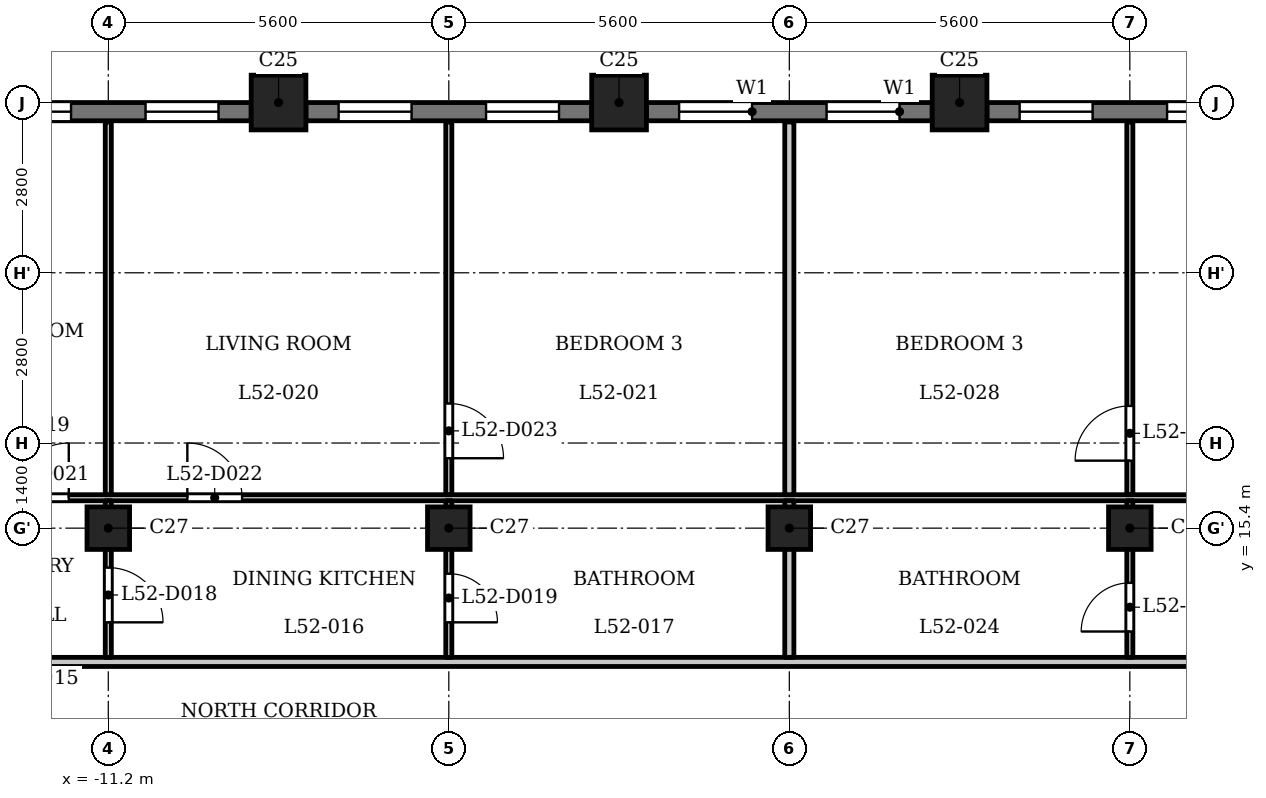
"""IFC4 building model, lengths in metres.
Left out: names, types, materials, properties, quantities, classifications, styles, units other than length and angle.
Written with IfcOpenShell. Run it as: python <this file> out.ifc"""

import sys

from ifc_helpers import new_model, si_unit, direction, frame, frame_2d, origin, origin_2d, place, context, subcontext, project, spatial, rectangle, extrude, element, fill, save


model = new_model("IFC4")
c1 = context("Model", 3, precision=1e-05, world=origin(), true_north=direction((0.0, 1.0)))
c2 = subcontext(c1, "Body", "Model", "MODEL_VIEW")
j1 = project(units=[si_unit("LENGTHUNIT", "METRE"), si_unit("PLANEANGLEUNIT", "RADIAN")], contexts=[c1])
p1 = place(None, origin())
s1 = spatial("IfcSite", under=j1, at=p1, CompositionType="ELEMENT")
p2 = place(p1, origin())
s2 = spatial("IfcBuilding", under=s1, at=p2, CompositionType="ELEMENT")
p3 = place(p2, frame((0.0, 0.0, 202.9)))
s3 = spatial("IfcBuildingStorey", under=s2, at=p3, CompositionType="ELEMENT", Elevation=202.9)
for number, where, z_axis, x_axis in (
    (1, (2.8, 22.4, 0.0), (0.0, 0.0, 1.0), (1.0, 0.0, 0.0)),
    (2, (-2.8, 22.4, 0.0), (0.0, 0.0, 1.0), (1.0, 0.0, 0.0)),
    (3, (-8.4, 22.4, 0.0), (0.0, 0.0, 1.0), (1.0, 0.0, 0.0)),
):
    element("IfcColumn", number, at=place(p3, frame(where, z_axis=z_axis, x_axis=x_axis)), inside=s3, PredefinedType="COLUMN", context=c2, shape_type="SweptSolid", body=[
        extrude(rectangle(XDim=0.9, YDim=0.9, at=origin_2d()), origin(), (0.0, 0.0, 1.0), 3.5),
    ])
for number, where, z_axis, x_axis in (
    (4, (-11.2, 15.4, 0.0), (0.0, 0.0, 1.0), (1.0, 0.0, 0.0)),
    (5, (-5.6, 15.4, 0.0), (0.0, 0.0, 1.0), (1.0, 0.0, 0.0)),
    (6, (0.0, 15.4, 0.0), (0.0, 0.0, 1.0), (1.0, 0.0, 0.0)),
    (7, (5.6, 15.4, 0.0), (0.0, 0.0, 1.0), (1.0, 0.0, 0.0)),
):
    element("IfcColumn", number, at=place(p3, frame(where, z_axis=z_axis, x_axis=x_axis)), inside=s3, PredefinedType="COLUMN", context=c2, shape_type="SweptSolid", body=[
        extrude(rectangle(XDim=0.7, YDim=0.7, at=origin_2d()), origin(), (0.0, 0.0, 1.0), 3.5),
    ])
p4 = place(p3, frame((7.95, 22.25, 0.0), z_axis=(0.0, 0.0, 1.0), x_axis=(-1.0, 0.0, 0.0)))
e8 = element("IfcWall", 8, at=p4, inside=s3, PredefinedType="SOLIDWALL", context=c2, shape_type="SweptSolid", body=[
    extrude(rectangle(XDim=4.7, YDim=0.3, at=frame_2d((2.35, 0.0))), origin(), (0.0, 0.0, 1.0), 2.5),
])
p5 = place(p4, frame((0.538, 0.0, 0.6)))
e9 = element("IfcOpeningElement", 9, at=p5, cuts=e8, PredefinedType="OPENING", context=c2, shape_type="SweptSolid", body=[
    extrude(rectangle(XDim=1.2, YDim=1.55, at=frame_2d((0.6, 0.775))), frame((0.0, 0.16, 0.0), z_axis=(0.0, -1.0, 0.0), x_axis=(1.0, 0.0, 0.0)), (0.0, 0.0, 1.0), 0.32),
])
p6 = place(p4, frame((2.962, 0.0, 0.6)))
e10 = element("IfcOpeningElement", 10, at=p6, cuts=e8, PredefinedType="OPENING", context=c2, shape_type="SweptSolid", body=[
    extrude(rectangle(XDim=1.2, YDim=1.55, at=frame_2d((0.6, 0.775))), frame((0.0, 0.16, 0.0), z_axis=(0.0, -1.0, 0.0), x_axis=(1.0, 0.0, 0.0)), (0.0, 0.0, 1.0), 0.32),
])
p7 = place(p3, frame((2.35, 22.25, 0.0), z_axis=(0.0, 0.0, 1.0), x_axis=(-1.0, 0.0, 0.0)))
e11 = element("IfcWall", 11, at=p7, inside=s3, PredefinedType="SOLIDWALL", context=c2, shape_type="SweptSolid", body=[
    extrude(rectangle(XDim=4.7, YDim=0.3, at=frame_2d((2.35, 0.0))), origin(), (0.0, 0.0, 1.0), 2.5),
])
p8 = place(p7, frame((0.538, 0.0, 0.6)))
e12 = element("IfcOpeningElement", 12, at=p8, cuts=e11, PredefinedType="OPENING", context=c2, shape_type="SweptSolid", body=[
    extrude(rectangle(XDim=1.2, YDim=1.55, at=frame_2d((0.6, 0.775))), frame((0.0, 0.16, 0.0), z_axis=(0.0, -1.0, 0.0), x_axis=(1.0, 0.0, 0.0)), (0.0, 0.0, 1.0), 0.32),
])
p9 = place(p7, frame((2.962, 0.0, 0.6)))
e13 = element("IfcOpeningElement", 13, at=p9, cuts=e11, PredefinedType="OPENING", context=c2, shape_type="SweptSolid", body=[
    extrude(rectangle(XDim=1.2, YDim=1.55, at=frame_2d((0.6, 0.775))), frame((0.0, 0.16, 0.0), z_axis=(0.0, -1.0, 0.0), x_axis=(1.0, 0.0, 0.0)), (0.0, 0.0, 1.0), 0.32),
])
p10 = place(p3, frame((-3.25, 22.25, 0.0), z_axis=(0.0, 0.0, 1.0), x_axis=(-1.0, 0.0, 0.0)))
e14 = element("IfcWall", 14, at=p10, inside=s3, PredefinedType="SOLIDWALL", context=c2, shape_type="SweptSolid", body=[
    extrude(rectangle(XDim=4.7, YDim=0.3, at=frame_2d((2.35, 0.0))), origin(), (0.0, 0.0, 1.0), 2.5),
])
p11 = place(p10, frame((0.538, 0.0, 0.6)))
e15 = element("IfcOpeningElement", 15, at=p11, cuts=e14, PredefinedType="OPENING", context=c2, shape_type="SweptSolid", body=[
    extrude(rectangle(XDim=1.2, YDim=1.55, at=frame_2d((0.6, 0.775))), frame((0.0, 0.16, 0.0), z_axis=(0.0, -1.0, 0.0), x_axis=(1.0, 0.0, 0.0)), (0.0, 0.0, 1.0), 0.32),
])
p12 = place(p10, frame((2.962, 0.0, 0.6)))
e16 = element("IfcOpeningElement", 16, at=p12, cuts=e14, PredefinedType="OPENING", context=c2, shape_type="SweptSolid", body=[
    extrude(rectangle(XDim=1.2, YDim=1.55, at=frame_2d((0.6, 0.775))), frame((0.0, 0.16, 0.0), z_axis=(0.0, -1.0, 0.0), x_axis=(1.0, 0.0, 0.0)), (0.0, 0.0, 1.0), 0.32),
])
p13 = place(p3, frame((-8.85, 22.25, 0.0), z_axis=(0.0, 0.0, 1.0), x_axis=(-1.0, 0.0, 0.0)))
e17 = element("IfcWall", 17, at=p13, inside=s3, PredefinedType="SOLIDWALL", context=c2, shape_type="SweptSolid", body=[
    extrude(rectangle(XDim=4.7, YDim=0.3, at=frame_2d((2.35, 0.0))), origin(), (0.0, 0.0, 1.0), 2.5),
])
p14 = place(p13, frame((0.538, 0.0, 0.6)))
e18 = element("IfcOpeningElement", 18, at=p14, cuts=e17, PredefinedType="OPENING", context=c2, shape_type="SweptSolid", body=[
    extrude(rectangle(XDim=1.2, YDim=1.55, at=frame_2d((0.6, 0.775))), frame((0.0, 0.16, 0.0), z_axis=(0.0, -1.0, 0.0), x_axis=(1.0, 0.0, 0.0)), (0.0, 0.0, 1.0), 0.32),
])
p15 = place(p13, frame((2.962, 0.0, 0.6)))
e19 = element("IfcOpeningElement", 19, at=p15, cuts=e17, PredefinedType="OPENING", context=c2, shape_type="SweptSolid", body=[
    extrude(rectangle(XDim=1.2, YDim=1.55, at=frame_2d((0.6, 0.775))), frame((0.0, 0.16, 0.0), z_axis=(0.0, -1.0, 0.0), x_axis=(1.0, 0.0, 0.0)), (0.0, 0.0, 1.0), 0.32),
])
p16 = place(p3, frame((-17.4, 13.2, 0.0), z_axis=(0.0, 0.0, 1.0), x_axis=(1.0, 0.0, 0.0)))
e20 = element("IfcWall", 20, at=p16, inside=s3, PredefinedType="PARTITIONING", context=c2, shape_type="SweptSolid", body=[
    extrude(rectangle(XDim=34.8, YDim=0.15, at=frame_2d((17.4, 0.0))), origin(), (0.0, 0.0, 1.0), 3.2),
])
p17 = place(p16, frame((0.25, 0.0, 0.0)))
e21 = element("IfcOpeningElement", 21, at=p17, cuts=e20, PredefinedType="OPENING", context=c2, shape_type="SweptSolid", body=[
    extrude(rectangle(XDim=1.0, YDim=2.1, at=frame_2d((0.5, 1.05))), frame((0.0, 0.085, 0.0), z_axis=(0.0, -1.0, 0.0), x_axis=(1.0, 0.0, 0.0)), (0.0, 0.0, 1.0), 0.17),
])
p18 = place(p16, frame((33.65, 0.0, 0.0)))
e22 = element("IfcOpeningElement", 22, at=p18, cuts=e20, PredefinedType="OPENING", context=c2, shape_type="SweptSolid", body=[
    extrude(rectangle(XDim=1.0, YDim=2.1, at=frame_2d((0.5, 1.05))), frame((0.0, 0.085, 0.0), z_axis=(0.0, -1.0, 0.0), x_axis=(1.0, 0.0, 0.0)), (0.0, 0.0, 1.0), 0.17),
])
p19 = place(p3, frame((-16.725, 15.9, 0.0), z_axis=(0.0, 0.0, 1.0), x_axis=(1.0, 0.0, 0.0)))
e23 = element("IfcWall", 23, at=p19, inside=s3, PredefinedType="PARTITIONING", context=c2, shape_type="SweptSolid", body=[
    extrude(rectangle(XDim=33.45, YDim=0.1, at=frame_2d((16.725, 0.0))), origin(), (0.0, 0.0, 1.0), 3.2),
])
p20 = place(p19, frame((1.875, 0.0, 0.0)))
e24 = element("IfcOpeningElement", 24, at=p20, cuts=e23, PredefinedType="OPENING", context=c2, shape_type="SweptSolid", body=[
    extrude(rectangle(XDim=0.9, YDim=2.1, at=frame_2d((0.45, 1.05))), frame((0.0, 0.06, 0.0), z_axis=(0.0, -1.0, 0.0), x_axis=(1.0, 0.0, 0.0)), (0.0, 0.0, 1.0), 0.12),
])
p21 = place(p19, frame((3.975, 0.0, 0.0)))
e25 = element("IfcOpeningElement", 25, at=p21, cuts=e23, PredefinedType="OPENING", context=c2, shape_type="SweptSolid", body=[
    extrude(rectangle(XDim=0.9, YDim=2.1, at=frame_2d((0.45, 1.05))), frame((0.0, 0.06, 0.0), z_axis=(0.0, -1.0, 0.0), x_axis=(1.0, 0.0, 0.0)), (0.0, 0.0, 1.0), 0.12),
])
p22 = place(p19, frame((6.825, 0.0, 0.0)))
e26 = element("IfcOpeningElement", 26, at=p22, cuts=e23, PredefinedType="OPENING", context=c2, shape_type="SweptSolid", body=[
    extrude(rectangle(XDim=0.9, YDim=2.1, at=frame_2d((0.45, 1.05))), frame((0.0, 0.06, 0.0), z_axis=(0.0, -1.0, 0.0), x_axis=(1.0, 0.0, 0.0)), (0.0, 0.0, 1.0), 0.12),
])
p23 = place(p19, frame((28.975, 0.0, 0.0)))
e27 = element("IfcOpeningElement", 27, at=p23, cuts=e23, PredefinedType="OPENING", context=c2, shape_type="SweptSolid", body=[
    extrude(rectangle(XDim=0.9, YDim=2.1, at=frame_2d((0.45, 1.05))), frame((0.0, 0.06, 0.0), z_axis=(0.0, -1.0, 0.0), x_axis=(1.0, 0.0, 0.0)), (0.0, 0.0, 1.0), 0.12),
])
p24 = place(p19, frame((30.725, 0.0, 0.0)))
e28 = element("IfcOpeningElement", 28, at=p24, cuts=e23, PredefinedType="OPENING", context=c2, shape_type="SweptSolid", body=[
    extrude(rectangle(XDim=0.9, YDim=2.1, at=frame_2d((0.45, 1.05))), frame((0.0, 0.06, 0.0), z_axis=(0.0, -1.0, 0.0), x_axis=(1.0, 0.0, 0.0)), (0.0, 0.0, 1.0), 0.12),
])
p25 = place(p19, frame((25.625, 0.0, 0.0)))
e29 = element("IfcOpeningElement", 29, at=p25, cuts=e23, PredefinedType="OPENING", context=c2, shape_type="SweptSolid", body=[
    extrude(rectangle(XDim=0.9, YDim=2.1, at=frame_2d((0.45, 1.05))), frame((0.0, 0.06, 0.0), z_axis=(0.0, -1.0, 0.0), x_axis=(1.0, 0.0, 0.0)), (0.0, 0.0, 1.0), 0.12),
])
p26 = place(p3, frame((-11.2, 13.275, 0.0), z_axis=(0.0, 0.0, 1.0), x_axis=(0.0, 1.0, 0.0)))
e30 = element("IfcWall", 30, at=p26, inside=s3, PredefinedType="PARTITIONING", context=c2, shape_type="SweptSolid", body=[
    extrude(rectangle(XDim=2.575, YDim=0.1, at=frame_2d((1.288, 0.0))), origin(), (0.0, 0.0, 1.0), 3.2),
])
p27 = place(p26, frame((0.576, 0.0, 0.0)))
e31 = element("IfcOpeningElement", 31, at=p27, cuts=e30, PredefinedType="OPENING", context=c2, shape_type="SweptSolid", body=[
    extrude(rectangle(XDim=0.9, YDim=2.1, at=frame_2d((0.45, 1.05))), frame((0.0, 0.06, 0.0), z_axis=(0.0, -1.0, 0.0), x_axis=(1.0, 0.0, 0.0)), (0.0, 0.0, 1.0), 0.12),
])
p28 = place(p3, frame((-11.2, 15.95, 0.0), z_axis=(0.0, 0.0, 1.0), x_axis=(0.0, 1.0, 0.0)))
e32 = element("IfcWall", 32, at=p28, inside=s3, PredefinedType="PARTITIONING", context=c2, shape_type="SweptSolid", body=[
    extrude(rectangle(XDim=6.13, YDim=0.1, at=frame_2d((3.065, 0.0))), origin(), (0.0, 0.0, 1.0), 3.2),
])
p29 = place(p3, frame((-5.6, 13.275, 0.0), z_axis=(0.0, 0.0, 1.0), x_axis=(0.0, 1.0, 0.0)))
e33 = element("IfcWall", 33, at=p29, inside=s3, PredefinedType="PARTITIONING", context=c2, shape_type="SweptSolid", body=[
    extrude(rectangle(XDim=2.575, YDim=0.1, at=frame_2d((1.288, 0.0))), origin(), (0.0, 0.0, 1.0), 3.2),
])
p30 = place(p29, frame((0.576, 0.0, 0.0)))
e34 = element("IfcOpeningElement", 34, at=p30, cuts=e33, PredefinedType="OPENING", context=c2, shape_type="SweptSolid", body=[
    extrude(rectangle(XDim=0.8, YDim=2.1, at=frame_2d((0.4, 1.05))), frame((0.0, 0.06, 0.0), z_axis=(0.0, -1.0, 0.0), x_axis=(1.0, 0.0, 0.0)), (0.0, 0.0, 1.0), 0.12),
])
p31 = place(p3, frame((-5.6, 15.95, 0.0), z_axis=(0.0, 0.0, 1.0), x_axis=(0.0, 1.0, 0.0)))
e35 = element("IfcWall", 35, at=p31, inside=s3, PredefinedType="PARTITIONING", context=c2, shape_type="SweptSolid", body=[
    extrude(rectangle(XDim=6.13, YDim=0.1, at=frame_2d((3.065, 0.0))), origin(), (0.0, 0.0, 1.0), 3.2),
])
p32 = place(p31, frame((0.6, 0.0, 0.0)))
e36 = element("IfcOpeningElement", 36, at=p32, cuts=e35, PredefinedType="OPENING", context=c2, shape_type="SweptSolid", body=[
    extrude(rectangle(XDim=0.9, YDim=2.1, at=frame_2d((0.45, 1.05))), frame((0.0, 0.06, 0.0), z_axis=(0.0, -1.0, 0.0), x_axis=(1.0, 0.0, 0.0)), (0.0, 0.0, 1.0), 0.12),
])
p33 = place(p3, frame((0.0, 13.275, 0.0), z_axis=(0.0, 0.0, 1.0), x_axis=(0.0, 1.0, 0.0)))
e37 = element("IfcWall", 37, at=p33, inside=s3, PredefinedType="PARTITIONING", context=c2, shape_type="SweptSolid", body=[
    extrude(rectangle(XDim=2.575, YDim=0.15, at=frame_2d((1.288, 0.0))), origin(), (0.0, 0.0, 1.0), 3.2),
])
p34 = place(p3, frame((0.0, 15.95, 0.0), z_axis=(0.0, 0.0, 1.0), x_axis=(0.0, 1.0, 0.0)))
e38 = element("IfcWall", 38, at=p34, inside=s3, PredefinedType="PARTITIONING", context=c2, shape_type="SweptSolid", body=[
    extrude(rectangle(XDim=6.13, YDim=0.15, at=frame_2d((3.065, 0.0))), origin(), (0.0, 0.0, 1.0), 3.2),
])
p35 = place(p3, frame((5.6, 13.275, 0.0), z_axis=(0.0, 0.0, 1.0), x_axis=(0.0, 1.0, 0.0)))
e39 = element("IfcWall", 39, at=p35, inside=s3, PredefinedType="PARTITIONING", context=c2, shape_type="SweptSolid", body=[
    extrude(rectangle(XDim=2.575, YDim=0.1, at=frame_2d((1.288, 0.0))), origin(), (0.0, 0.0, 1.0), 3.2),
])
p36 = place(p35, frame((0.425, 0.0, 0.0)))
e40 = element("IfcOpeningElement", 40, at=p36, cuts=e39, PredefinedType="OPENING", context=c2, shape_type="SweptSolid", body=[
    extrude(rectangle(XDim=0.8, YDim=2.1, at=frame_2d((0.4, 1.05))), frame((0.0, 0.06, 0.0), z_axis=(0.0, -1.0, 0.0), x_axis=(1.0, 0.0, 0.0)), (0.0, 0.0, 1.0), 0.12),
])
p37 = place(p3, frame((5.6, 15.95, 0.0), z_axis=(0.0, 0.0, 1.0), x_axis=(0.0, 1.0, 0.0)))
e41 = element("IfcWall", 41, at=p37, inside=s3, PredefinedType="PARTITIONING", context=c2, shape_type="SweptSolid", body=[
    extrude(rectangle(XDim=6.13, YDim=0.1, at=frame_2d((3.065, 0.0))), origin(), (0.0, 0.0, 1.0), 3.2),
])
p38 = place(p37, frame((0.56, 0.0, 0.0)))
e42 = element("IfcOpeningElement", 42, at=p38, cuts=e41, PredefinedType="OPENING", context=c2, shape_type="SweptSolid", body=[
    extrude(rectangle(XDim=0.9, YDim=2.1, at=frame_2d((0.45, 1.05))), frame((0.0, 0.06, 0.0), z_axis=(0.0, -1.0, 0.0), x_axis=(1.0, 0.0, 0.0)), (0.0, 0.0, 1.0), 0.12),
])
p39 = place(p27, origin())
e43 = element("IfcDoor", 43, at=p39, inside=s3, OperationType="SINGLE_SWING_LEFT", PredefinedType="DOOR", context=c2, shape_type="SweptSolid", body=[
    extrude(rectangle(XDim=0.9, YDim=2.1, at=frame_2d((0.45, 1.05))), frame((0.0, 0.025, 0.0), z_axis=(0.0, -1.0, 0.0), x_axis=(1.0, 0.0, 0.0)), (0.0, 0.0, 1.0), 0.05),
])
fill(e31, e43)
p40 = place(p30, origin())
e44 = element("IfcDoor", 44, at=p40, inside=s3, OperationType="SINGLE_SWING_LEFT", PredefinedType="DOOR", context=c2, shape_type="SweptSolid", body=[
    extrude(rectangle(XDim=0.8, YDim=2.1, at=frame_2d((0.4, 1.05))), frame((0.0, 0.025, 0.0), z_axis=(0.0, -1.0, 0.0), x_axis=(1.0, 0.0, 0.0)), (0.0, 0.0, 1.0), 0.05),
])
fill(e34, e44)
p41 = place(p21, origin())
e45 = element("IfcDoor", 45, at=p41, inside=s3, OperationType="SINGLE_SWING_LEFT", PredefinedType="DOOR", context=c2, shape_type="SweptSolid", body=[
    extrude(rectangle(XDim=0.9, YDim=2.1, at=frame_2d((0.45, 1.05))), frame((0.0, 0.025, 0.0), z_axis=(0.0, -1.0, 0.0), x_axis=(1.0, 0.0, 0.0)), (0.0, 0.0, 1.0), 0.05),
])
fill(e25, e45)
p42 = place(p22, origin())
e46 = element("IfcDoor", 46, at=p42, inside=s3, OperationType="SINGLE_SWING_RIGHT", PredefinedType="DOOR", context=c2, shape_type="SweptSolid", body=[
    extrude(rectangle(XDim=0.9, YDim=2.1, at=frame_2d((0.45, 1.05))), frame((0.0, 0.025, 0.0), z_axis=(0.0, -1.0, 0.0), x_axis=(1.0, 0.0, 0.0)), (0.0, 0.0, 1.0), 0.05),
])
fill(e26, e46)
p43 = place(p32, origin())
e47 = element("IfcDoor", 47, at=p43, inside=s3, OperationType="SINGLE_SWING_LEFT", PredefinedType="DOOR", context=c2, shape_type="SweptSolid", body=[
    extrude(rectangle(XDim=0.9, YDim=2.1, at=frame_2d((0.45, 1.05))), frame((0.0, 0.025, 0.0), z_axis=(0.0, -1.0, 0.0), x_axis=(1.0, 0.0, 0.0)), (0.0, 0.0, 1.0), 0.05),
])
fill(e36, e47)
p44 = place(p36, origin())
e48 = element("IfcDoor", 48, at=p44, inside=s3, OperationType="SINGLE_SWING_RIGHT", PredefinedType="DOOR", context=c2, shape_type="SweptSolid", body=[
    extrude(rectangle(XDim=0.8, YDim=2.1, at=frame_2d((0.4, 1.05))), frame((0.0, 0.025, 0.0), z_axis=(0.0, -1.0, 0.0), x_axis=(1.0, 0.0, 0.0)), (0.0, 0.0, 1.0), 0.05),
])
fill(e40, e48)
p45 = place(p38, origin())
e49 = element("IfcDoor", 49, at=p45, inside=s3, OperationType="SINGLE_SWING_RIGHT", PredefinedType="DOOR", context=c2, shape_type="SweptSolid", body=[
    extrude(rectangle(XDim=0.9, YDim=2.1, at=frame_2d((0.45, 1.05))), frame((0.0, 0.025, 0.0), z_axis=(0.0, -1.0, 0.0), x_axis=(1.0, 0.0, 0.0)), (0.0, 0.0, 1.0), 0.05),
])
fill(e42, e49)
p46 = place(p5, origin())
e50 = element("IfcWindow", 50, at=p46, inside=s3, PartitioningType="SINGLE_PANEL", PredefinedType="WINDOW", context=c2, shape_type="SweptSolid", body=[
    extrude(rectangle(XDim=1.2, YDim=1.55, at=frame_2d((0.6, 0.775))), frame((0.0, 0.03, 0.0), z_axis=(0.0, -1.0, 0.0), x_axis=(1.0, 0.0, 0.0)), (0.0, 0.0, 1.0), 0.06),
])
fill(e9, e50)
p47 = place(p6, origin())
e51 = element("IfcWindow", 51, at=p47, inside=s3, PartitioningType="SINGLE_PANEL", PredefinedType="WINDOW", context=c2, shape_type="SweptSolid", body=[
    extrude(rectangle(XDim=1.2, YDim=1.55, at=frame_2d((0.6, 0.775))), frame((0.0, 0.03, 0.0), z_axis=(0.0, -1.0, 0.0), x_axis=(1.0, 0.0, 0.0)), (0.0, 0.0, 1.0), 0.06),
])
fill(e10, e51)
p48 = place(p8, origin())
e52 = element("IfcWindow", 52, at=p48, inside=s3, PartitioningType="SINGLE_PANEL", PredefinedType="WINDOW", context=c2, shape_type="SweptSolid", body=[
    extrude(rectangle(XDim=1.2, YDim=1.55, at=frame_2d((0.6, 0.775))), frame((0.0, 0.03, 0.0), z_axis=(0.0, -1.0, 0.0), x_axis=(1.0, 0.0, 0.0)), (0.0, 0.0, 1.0), 0.06),
])
fill(e12, e52)
p49 = place(p9, origin())
e53 = element("IfcWindow", 53, at=p49, inside=s3, PartitioningType="SINGLE_PANEL", PredefinedType="WINDOW", context=c2, shape_type="SweptSolid", body=[
    extrude(rectangle(XDim=1.2, YDim=1.55, at=frame_2d((0.6, 0.775))), frame((0.0, 0.03, 0.0), z_axis=(0.0, -1.0, 0.0), x_axis=(1.0, 0.0, 0.0)), (0.0, 0.0, 1.0), 0.06),
])
fill(e13, e53)
p50 = place(p11, origin())
e54 = element("IfcWindow", 54, at=p50, inside=s3, PartitioningType="SINGLE_PANEL", PredefinedType="WINDOW", context=c2, shape_type="SweptSolid", body=[
    extrude(rectangle(XDim=1.2, YDim=1.55, at=frame_2d((0.6, 0.775))), frame((0.0, 0.03, 0.0), z_axis=(0.0, -1.0, 0.0), x_axis=(1.0, 0.0, 0.0)), (0.0, 0.0, 1.0), 0.06),
])
fill(e15, e54)
p51 = place(p12, origin())
e55 = element("IfcWindow", 55, at=p51, inside=s3, PartitioningType="SINGLE_PANEL", PredefinedType="WINDOW", context=c2, shape_type="SweptSolid", body=[
    extrude(rectangle(XDim=1.2, YDim=1.55, at=frame_2d((0.6, 0.775))), frame((0.0, 0.03, 0.0), z_axis=(0.0, -1.0, 0.0), x_axis=(1.0, 0.0, 0.0)), (0.0, 0.0, 1.0), 0.06),
])
fill(e16, e55)
p52 = place(p14, origin())
e56 = element("IfcWindow", 56, at=p52, inside=s3, PartitioningType="SINGLE_PANEL", PredefinedType="WINDOW", context=c2, shape_type="SweptSolid", body=[
    extrude(rectangle(XDim=1.2, YDim=1.55, at=frame_2d((0.6, 0.775))), frame((0.0, 0.03, 0.0), z_axis=(0.0, -1.0, 0.0), x_axis=(1.0, 0.0, 0.0)), (0.0, 0.0, 1.0), 0.06),
])
fill(e18, e56)
p53 = place(p15, origin())
e57 = element("IfcWindow", 57, at=p53, inside=s3, PartitioningType="SINGLE_PANEL", PredefinedType="WINDOW", context=c2, shape_type="SweptSolid", body=[
    extrude(rectangle(XDim=1.2, YDim=1.55, at=frame_2d((0.6, 0.775))), frame((0.0, 0.03, 0.0), z_axis=(0.0, -1.0, 0.0), x_axis=(1.0, 0.0, 0.0)), (0.0, 0.0, 1.0), 0.06),
])
fill(e19, e57)
save(model, sys.argv[1])
